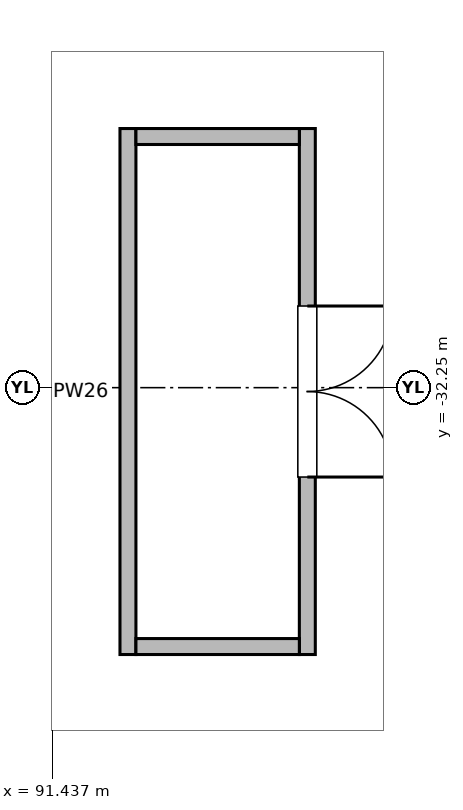
"""IFC4 building model, lengths in metres.
Left out: names, types, materials, properties, quantities, classifications, styles, units other than length and angle.
Written with IfcOpenShell. Run it as: python <this file> out.ifc"""

import sys

from ifc_helpers import new_model, si_unit, direction, frame, frame_2d, origin, place, context, subcontext, project, spatial, rectangle, extrude, element, fill, save


model = new_model("IFC4")
c1 = context("Model", 3, precision=1e-05, world=origin(), true_north=direction((0.0, 1.0)))
c2 = subcontext(c1, "Body", "Model", "MODEL_VIEW")
j1 = project(units=[si_unit("LENGTHUNIT", "METRE"), si_unit("PLANEANGLEUNIT", "RADIAN")], contexts=[c1])
p1 = place(None, origin())
s1 = spatial("IfcSite", under=j1, at=p1, CompositionType="ELEMENT")
p2 = place(p1, origin())
s2 = spatial("IfcBuilding", under=s1, at=p2, CompositionType="ELEMENT")
p3 = place(p2, frame((0.0, 0.0, -6.0)))
s3 = spatial("IfcBuildingStorey", under=s2, at=p3, CompositionType="ELEMENT", Elevation=-6.0)
p4 = place(p3, frame((94.792, -28.841, 0.0), z_axis=(0.0, 0.0, 1.0), x_axis=(0.0, -1.0, 0.0)))
e1 = element("IfcWall", 1, at=p4, inside=s3, PredefinedType="PARTITIONING", context=c2, shape_type="SweptSolid", body=[
    extrude(rectangle(XDim=6.92, YDim=0.21, at=frame_2d((3.46, 0.0))), origin(), (0.0, 0.0, 1.0), 5.02),
])
p5 = place(p4, frame((2.335, 0.0, 0.0)))
e2 = element("IfcOpeningElement", 2, at=p5, cuts=e1, PredefinedType="OPENING", context=c2, shape_type="SweptSolid", body=[
    extrude(rectangle(XDim=2.25, YDim=2.45, at=frame_2d((1.125, 1.225))), frame((0.0, 0.115, 0.0), z_axis=(0.0, -1.0, 0.0), x_axis=(1.0, 0.0, 0.0)), (0.0, 0.0, 1.0), 0.23),
])
p6 = place(p3, frame((92.432, -35.761, 0.0), z_axis=(0.0, 0.0, 1.0), x_axis=(0.0, 1.0, 0.0)))
e3 = element("IfcWall", 3, at=p6, inside=s3, PredefinedType="PARTITIONING", context=c2, shape_type="SweptSolid", body=[
    extrude(rectangle(XDim=6.92, YDim=0.21, at=frame_2d((3.46, 0.0))), origin(), (0.0, 0.0, 1.0), 5.02),
])
for number, where, z_axis, x_axis in (
    (4, (92.537, -35.656, 0.0), (0.0, 0.0, 1.0), (1.0, 0.0, 0.0)),
    (5, (92.537, -28.946, 0.0), (0.0, 0.0, 1.0), (1.0, 0.0, 0.0)),
):
    element("IfcWall", number, at=place(p3, frame(where, z_axis=z_axis, x_axis=x_axis)), inside=s3, PredefinedType="PARTITIONING", context=c2, shape_type="SweptSolid", body=[
        extrude(rectangle(XDim=2.15, YDim=0.21, at=frame_2d((1.075, 0.0))), origin(), (0.0, 0.0, 1.0), 5.02),
    ])
p7 = place(p5, origin())
e6 = element("IfcDoor", 6, at=p7, inside=s3, OperationType="DOUBLE_DOOR_SINGLE_SWING", PredefinedType="DOOR", context=c2, shape_type="SweptSolid", body=[
    extrude(rectangle(XDim=2.25, YDim=2.45, at=frame_2d((1.125, 1.225))), frame((0.0, 0.025, 0.0), z_axis=(0.0, -1.0, 0.0), x_axis=(1.0, 0.0, 0.0)), (0.0, 0.0, 1.0), 0.05),
])
fill(e2, e6)
save(model, sys.argv[1])
